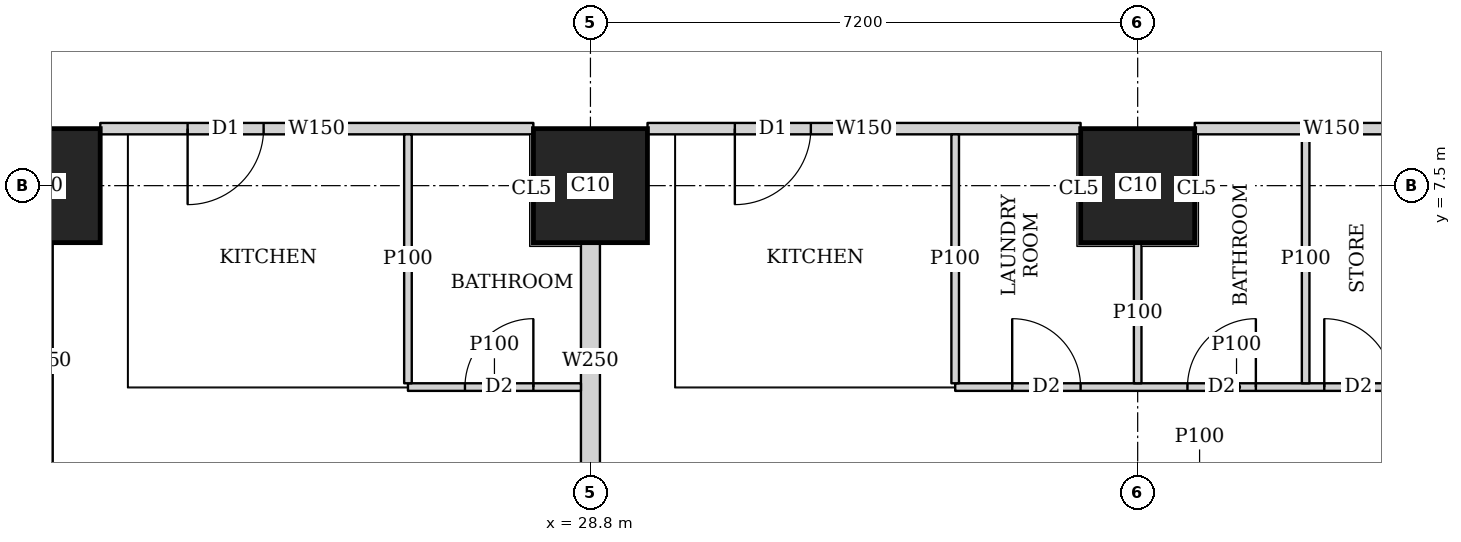
"""IFC4 building model, lengths in metres.
Left out: names, types, materials, properties, quantities, classifications, styles, units other than length and angle.
Written with IfcOpenShell. Run it as: python <this file> out.ifc"""

import sys

from ifc_helpers import new_model, si_unit, direction, frame, frame_2d, origin, origin_2d, place, context, subcontext, project, spatial, rectangle, extrude, element, fill, save


model = new_model("IFC4")
c1 = context("Model", 3, precision=1e-05, world=origin(), true_north=direction((0.0, 1.0)))
c2 = subcontext(c1, "Body", "Model", "MODEL_VIEW")
j1 = project(units=[si_unit("LENGTHUNIT", "METRE"), si_unit("PLANEANGLEUNIT", "RADIAN")], contexts=[c1])
p1 = place(None, origin())
s1 = spatial("IfcSite", under=j1, at=p1, CompositionType="ELEMENT")
p2 = place(p1, origin())
s2 = spatial("IfcBuilding", under=s1, at=p2, CompositionType="ELEMENT")
p3 = place(p2, frame((0.0, 0.0, 169.55)))
s3 = spatial("IfcBuildingStorey", under=s2, at=p3, CompositionType="ELEMENT", Elevation=169.55)
for number, where, z_axis, x_axis in (
    (1, (21.6, 7.5, 0.0), (0.0, 0.0, 1.0), (1.0, 0.0, 0.0)),
    (2, (28.8, 7.5, 0.0), (0.0, 0.0, 1.0), (1.0, 0.0, 0.0)),
    (3, (36.0, 7.5, 0.0), (0.0, 0.0, 1.0), (1.0, 0.0, 0.0)),
):
    element("IfcColumn", number, at=place(p3, frame(where, z_axis=z_axis, x_axis=x_axis)), inside=s3, PredefinedType="COLUMN", context=c2, shape_type="SweptSolid", body=[
        extrude(rectangle(XDim=1.5, YDim=1.5, at=origin_2d()), origin(), (0.0, 0.0, 1.0), 3.75),
    ])
p4 = place(p3, frame((40.356, 8.25, 0.0), z_axis=(0.0, 0.0, 1.0), x_axis=(-1.0, 0.0, 0.0)))
e4 = element("IfcWall", 4, at=p4, inside=s3, PredefinedType="SOLIDWALL", context=c2, shape_type="SweptSolid", body=[
    extrude(rectangle(XDim=3.605, YDim=0.15, at=frame_2d((1.802, 0.0))), origin(), (0.0, 0.0, 1.0), 3.5),
])
p5 = place(p3, frame((35.249, 8.25, 0.0), z_axis=(0.0, 0.0, 1.0), x_axis=(-1.0, 0.0, 0.0)))
e5 = element("IfcWall", 5, at=p5, inside=s3, PredefinedType="SOLIDWALL", context=c2, shape_type="SweptSolid", body=[
    extrude(rectangle(XDim=5.698, YDim=0.15, at=frame_2d((2.849, 0.0))), origin(), (0.0, 0.0, 1.0), 3.5),
])
p6 = place(p5, frame((3.549, 0.0, 0.0)))
e6 = element("IfcOpeningElement", 6, at=p6, cuts=e5, PredefinedType="OPENING", context=c2, shape_type="SweptSolid", body=[
    extrude(rectangle(XDim=1.0, YDim=2.1, at=frame_2d((0.5, 1.05))), frame((0.0, 0.085, 0.0), z_axis=(0.0, -1.0, 0.0), x_axis=(1.0, 0.0, 0.0)), (0.0, 0.0, 1.0), 0.17),
])
p7 = place(p3, frame((28.049, 8.25, 0.0), z_axis=(0.0, 0.0, 1.0), x_axis=(-1.0, 0.0, 0.0)))
e7 = element("IfcWall", 7, at=p7, inside=s3, PredefinedType="SOLIDWALL", context=c2, shape_type="SweptSolid", body=[
    extrude(rectangle(XDim=5.698, YDim=0.15, at=frame_2d((2.849, 0.0))), origin(), (0.0, 0.0, 1.0), 3.5),
])
p8 = place(p7, frame((3.549, 0.0, 0.0)))
e8 = element("IfcOpeningElement", 8, at=p8, cuts=e7, PredefinedType="OPENING", context=c2, shape_type="SweptSolid", body=[
    extrude(rectangle(XDim=1.0, YDim=2.1, at=frame_2d((0.5, 1.05))), frame((0.0, 0.085, 0.0), z_axis=(0.0, -1.0, 0.0), x_axis=(1.0, 0.0, 0.0)), (0.0, 0.0, 1.0), 0.17),
])
p9 = place(p3, frame((33.877, 43.029, 0.0), z_axis=(0.0, 0.0, 1.0), x_axis=(0.185596841028, -0.98262597798, 0.0)))
e9 = element("IfcWall", 9, at=p9, inside=s3, PredefinedType="SOLIDWALL", context=c2, shape_type="SweptSolid", body=[
    extrude(rectangle(XDim=41.66, YDim=0.15, at=frame_2d((20.83, 0.0))), origin(), (0.0, 0.0, 1.0), 2.5),
])
p10 = place(p9, frame((8.63, 0.0, 0.0)))
e10 = element("IfcOpeningElement", 10, at=p10, cuts=e9, PredefinedType="OPENING", context=c2, shape_type="SweptSolid", body=[
    extrude(rectangle(XDim=1.0, YDim=2.1, at=frame_2d((0.5, 1.05))), frame((0.0, 0.085, 0.0), z_axis=(0.0, -1.0, 0.0), x_axis=(1.0, 0.0, 0.0)), (0.0, 0.0, 1.0), 0.17),
])
p11 = place(p9, frame((13.841, 0.0, 0.0)))
e11 = element("IfcOpeningElement", 11, at=p11, cuts=e9, PredefinedType="OPENING", context=c2, shape_type="SweptSolid", body=[
    extrude(rectangle(XDim=1.0, YDim=2.1, at=frame_2d((0.5, 1.05))), frame((0.0, 0.085, 0.0), z_axis=(0.0, -1.0, 0.0), x_axis=(1.0, 0.0, 0.0)), (0.0, 0.0, 1.0), 0.17),
])
p12 = place(p9, frame((21.474, 0.0, 0.0)))
e12 = element("IfcOpeningElement", 12, at=p12, cuts=e9, PredefinedType="OPENING", context=c2, shape_type="SweptSolid", body=[
    extrude(rectangle(XDim=1.0, YDim=2.1, at=frame_2d((0.5, 1.05))), frame((0.0, 0.085, 0.0), z_axis=(0.0, -1.0, 0.0), x_axis=(1.0, 0.0, 0.0)), (0.0, 0.0, 1.0), 0.17),
])
p13 = place(p9, frame((30.4, 0.0, 0.0)))
e13 = element("IfcOpeningElement", 13, at=p13, cuts=e9, PredefinedType="OPENING", context=c2, shape_type="SweptSolid", body=[
    extrude(rectangle(XDim=1.0, YDim=2.1, at=frame_2d((0.5, 1.05))), frame((0.0, 0.085, 0.0), z_axis=(0.0, -1.0, 0.0), x_axis=(1.0, 0.0, 0.0)), (0.0, 0.0, 1.0), 0.17),
])
p14 = place(p9, frame((32.288, 0.0, 0.0)))
e14 = element("IfcOpeningElement", 14, at=p14, cuts=e9, PredefinedType="OPENING", context=c2, shape_type="SweptSolid", body=[
    extrude(rectangle(XDim=1.0, YDim=2.1, at=frame_2d((0.5, 1.05))), frame((0.0, 0.085, 0.0), z_axis=(0.0, -1.0, 0.0), x_axis=(1.0, 0.0, 0.0)), (0.0, 0.0, 1.0), 0.17),
])
p15 = place(p3, frame((28.675, 4.85, 0.0), z_axis=(0.0, 0.0, 1.0), x_axis=(-1.0, 0.0, 0.0)))
e15 = element("IfcWall", 15, at=p15, inside=s3, PredefinedType="PARTITIONING", context=c2, shape_type="SweptSolid", body=[
    extrude(rectangle(XDim=2.276, YDim=0.1, at=frame_2d((1.138, 0.0))), origin(), (0.0, 0.0, 1.0), 3.5),
])
p16 = place(p15, frame((0.626, 0.0, 0.0)))
e16 = element("IfcOpeningElement", 16, at=p16, cuts=e15, PredefinedType="OPENING", context=c2, shape_type="SweptSolid", body=[
    extrude(rectangle(XDim=0.9, YDim=2.1, at=frame_2d((0.45, 1.05))), frame((0.0, 0.06, 0.0), z_axis=(0.0, -1.0, 0.0), x_axis=(1.0, 0.0, 0.0)), (0.0, 0.0, 1.0), 0.12),
])
p17 = place(p3, frame((26.399, 4.9, 0.0), z_axis=(0.0, 0.0, 1.0), x_axis=(0.0, 1.0, 0.0)))
e17 = element("IfcWall", 17, at=p17, inside=s3, PredefinedType="PARTITIONING", context=c2, shape_type="SweptSolid", body=[
    extrude(rectangle(XDim=3.275, YDim=0.1, at=frame_2d((1.638, 0.0))), origin(), (0.0, 0.0, 1.0), 3.5),
])
p18 = place(p3, frame((21.6, 3.65, 0.0), z_axis=(0.0, 0.0, 1.0), x_axis=(0.0, 1.0, 0.0)))
e18 = element("IfcWall", 18, at=p18, inside=s3, PredefinedType="SOLIDWALL", context=c2, shape_type="SweptSolid", body=[
    extrude(rectangle(XDim=3.099, YDim=0.25, at=frame_2d((1.55, 0.0))), origin(), (0.0, 0.0, 1.0), 3.5),
])
p19 = place(p3, frame((41.002, 4.85, 0.0), z_axis=(0.0, 0.0, 1.0), x_axis=(-1.0, 0.0, 0.0)))
e19 = element("IfcWall", 19, at=p19, inside=s3, PredefinedType="PARTITIONING", context=c2, shape_type="SweptSolid", body=[
    extrude(rectangle(XDim=7.403, YDim=0.1, at=frame_2d((3.701, 0.0))), origin(), (0.0, 0.0, 1.0), 3.5),
])
p20 = place(p19, frame((5.753, 0.0, 0.0)))
e20 = element("IfcOpeningElement", 20, at=p20, cuts=e19, PredefinedType="OPENING", context=c2, shape_type="SweptSolid", body=[
    extrude(rectangle(XDim=0.9, YDim=2.1, at=frame_2d((0.45, 1.05))), frame((0.0, 0.06, 0.0), z_axis=(0.0, -1.0, 0.0), x_axis=(1.0, 0.0, 0.0)), (0.0, 0.0, 1.0), 0.12),
])
p21 = place(p19, frame((3.447, 0.0, 0.0)))
e21 = element("IfcOpeningElement", 21, at=p21, cuts=e19, PredefinedType="OPENING", context=c2, shape_type="SweptSolid", body=[
    extrude(rectangle(XDim=0.9, YDim=2.1, at=frame_2d((0.45, 1.05))), frame((0.0, 0.06, 0.0), z_axis=(0.0, -1.0, 0.0), x_axis=(1.0, 0.0, 0.0)), (0.0, 0.0, 1.0), 0.12),
])
p22 = place(p19, frame((0.15, 0.0, 0.0)))
e22 = element("IfcOpeningElement", 22, at=p22, cuts=e19, PredefinedType="OPENING", context=c2, shape_type="SweptSolid", body=[
    extrude(rectangle(XDim=0.9, YDim=2.1, at=frame_2d((0.45, 1.05))), frame((0.0, 0.06, 0.0), z_axis=(0.0, -1.0, 0.0), x_axis=(1.0, 0.0, 0.0)), (0.0, 0.0, 1.0), 0.12),
])
p23 = place(p19, frame((1.647, 0.0, 0.0)))
e23 = element("IfcOpeningElement", 23, at=p23, cuts=e19, PredefinedType="OPENING", context=c2, shape_type="SweptSolid", body=[
    extrude(rectangle(XDim=0.9, YDim=2.1, at=frame_2d((0.45, 1.05))), frame((0.0, 0.06, 0.0), z_axis=(0.0, -1.0, 0.0), x_axis=(1.0, 0.0, 0.0)), (0.0, 0.0, 1.0), 0.12),
])
p24 = place(p3, frame((33.599, 4.9, 0.0), z_axis=(0.0, 0.0, 1.0), x_axis=(0.0, 1.0, 0.0)))
e24 = element("IfcWall", 24, at=p24, inside=s3, PredefinedType="PARTITIONING", context=c2, shape_type="SweptSolid", body=[
    extrude(rectangle(XDim=3.275, YDim=0.1, at=frame_2d((1.638, 0.0))), origin(), (0.0, 0.0, 1.0), 3.5),
])
p25 = place(p3, frame((36.0, 4.9, 0.0), z_axis=(0.0, 0.0, 1.0), x_axis=(0.0, 1.0, 0.0)))
e25 = element("IfcWall", 25, at=p25, inside=s3, PredefinedType="PARTITIONING", context=c2, shape_type="SweptSolid", body=[
    extrude(rectangle(XDim=1.849, YDim=0.1, at=frame_2d((0.925, 0.0))), origin(), (0.0, 0.0, 1.0), 3.5),
])
p26 = place(p3, frame((38.21, 4.9, 0.0), z_axis=(0.0, 0.0, 1.0), x_axis=(0.0, 1.0, 0.0)))
e26 = element("IfcWall", 26, at=p26, inside=s3, PredefinedType="PARTITIONING", context=c2, shape_type="SweptSolid", body=[
    extrude(rectangle(XDim=3.275, YDim=0.1, at=frame_2d((1.638, 0.0))), origin(), (0.0, 0.0, 1.0), 3.5),
])
p27 = place(p3, frame((28.8, 3.65, 0.0), z_axis=(0.0, 0.0, 1.0), x_axis=(0.0, 1.0, 0.0)))
e27 = element("IfcWall", 27, at=p27, inside=s3, PredefinedType="SOLIDWALL", context=c2, shape_type="SweptSolid", body=[
    extrude(rectangle(XDim=3.099, YDim=0.25, at=frame_2d((1.55, 0.0))), origin(), (0.0, 0.0, 1.0), 3.5),
])
p28 = place(p16, origin())
e28 = element("IfcDoor", 28, at=p28, inside=s3, OperationType="SINGLE_SWING_RIGHT", PredefinedType="DOOR", context=c2, shape_type="SweptSolid", body=[
    extrude(rectangle(XDim=0.9, YDim=2.1, at=frame_2d((0.45, 1.05))), frame((0.0, 0.025, 0.0), z_axis=(0.0, -1.0, 0.0), x_axis=(1.0, 0.0, 0.0)), (0.0, 0.0, 1.0), 0.05),
])
fill(e16, e28)
p29 = place(p8, origin())
e29 = element("IfcDoor", 29, at=p29, inside=s3, OperationType="SINGLE_SWING_RIGHT", PredefinedType="DOOR", context=c2, shape_type="SweptSolid", body=[
    extrude(rectangle(XDim=1.0, YDim=2.1, at=frame_2d((0.5, 1.05))), frame((0.0, 0.025, 0.0), z_axis=(0.0, -1.0, 0.0), x_axis=(1.0, 0.0, 0.0)), (0.0, 0.0, 1.0), 0.05),
])
fill(e8, e29)
p30 = place(p20, origin())
e30 = element("IfcDoor", 30, at=p30, inside=s3, OperationType="SINGLE_SWING_LEFT", PredefinedType="DOOR", context=c2, shape_type="SweptSolid", body=[
    extrude(rectangle(XDim=0.9, YDim=2.1, at=frame_2d((0.45, 1.05))), frame((0.0, 0.025, 0.0), z_axis=(0.0, -1.0, 0.0), x_axis=(1.0, 0.0, 0.0)), (0.0, 0.0, 1.0), 0.05),
])
fill(e20, e30)
p31 = place(p21, origin())
e31 = element("IfcDoor", 31, at=p31, inside=s3, OperationType="SINGLE_SWING_RIGHT", PredefinedType="DOOR", context=c2, shape_type="SweptSolid", body=[
    extrude(rectangle(XDim=0.9, YDim=2.1, at=frame_2d((0.45, 1.05))), frame((0.0, 0.025, 0.0), z_axis=(0.0, -1.0, 0.0), x_axis=(1.0, 0.0, 0.0)), (0.0, 0.0, 1.0), 0.05),
])
fill(e21, e31)
p32 = place(p23, origin())
e32 = element("IfcDoor", 32, at=p32, inside=s3, OperationType="SINGLE_SWING_LEFT", PredefinedType="DOOR", context=c2, shape_type="SweptSolid", body=[
    extrude(rectangle(XDim=0.9, YDim=2.1, at=frame_2d((0.45, 1.05))), frame((0.0, 0.025, 0.0), z_axis=(0.0, -1.0, 0.0), x_axis=(1.0, 0.0, 0.0)), (0.0, 0.0, 1.0), 0.05),
])
fill(e23, e32)
p33 = place(p6, origin())
e33 = element("IfcDoor", 33, at=p33, inside=s3, OperationType="SINGLE_SWING_RIGHT", PredefinedType="DOOR", context=c2, shape_type="SweptSolid", body=[
    extrude(rectangle(XDim=1.0, YDim=2.1, at=frame_2d((0.5, 1.05))), frame((0.0, 0.025, 0.0), z_axis=(0.0, -1.0, 0.0), x_axis=(1.0, 0.0, 0.0)), (0.0, 0.0, 1.0), 0.05),
])
fill(e6, e33)
save(model, sys.argv[1])
